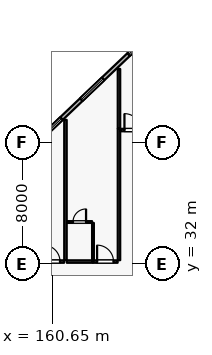
"""IFC4 building model, lengths in metres.
Left out: names, types, materials, properties, quantities, classifications, styles, units other than length and angle.
Written with IfcOpenShell. Run it as: python <this file> out.ifc"""

import sys

from ifc_helpers import new_model, si_unit, direction, frame, frame_2d, origin, place, context, subcontext, project, spatial, rectangle, extrude, element, fill, save


model = new_model("IFC4")
c1 = context("Model", 3, precision=1e-05, world=origin(), true_north=direction((0.0, 1.0)))
c2 = subcontext(c1, "Body", "Model", "MODEL_VIEW")
j1 = project(units=[si_unit("LENGTHUNIT", "METRE"), si_unit("PLANEANGLEUNIT", "RADIAN")], contexts=[c1])
p1 = place(None, origin())
s1 = spatial("IfcSite", under=j1, at=p1, CompositionType="ELEMENT")
p2 = place(p1, origin())
s2 = spatial("IfcBuilding", under=s1, at=p2, CompositionType="ELEMENT")
p3 = place(p2, frame((0.0, 0.0, 32.4)))
s3 = spatial("IfcBuildingStorey", under=s2, at=p3, CompositionType="ELEMENT", Elevation=32.4)
p4 = place(p3, frame((159.95, 40.333, 0.0), z_axis=(0.0, 0.0, 1.0), x_axis=(0.724105170588, 0.689689569247, 0.0)))
e1 = element("IfcWall", 1, at=p4, inside=s3, PredefinedType="SOLIDWALL", context=c2, shape_type="SweptSolid", body=[
    extrude(rectangle(XDim=10.634, YDim=0.24, at=frame_2d((5.317, 0.0))), origin(), (0.0, 0.0, 1.0), 2.89),
])
p5 = place(p4, frame((0.215, 0.0, 0.8)))
e2 = element("IfcOpeningElement", 2, at=p5, cuts=e1, PredefinedType="OPENING", context=c2, shape_type="SweptSolid", body=[
    extrude(rectangle(XDim=1.6, YDim=1.6, at=frame_2d((0.8, 0.8))), frame((0.0, 0.13, 0.0), z_axis=(0.0, -1.0, 0.0), x_axis=(1.0, 0.0, 0.0)), (0.0, 0.0, 1.0), 0.26),
])
p6 = place(p4, frame((3.599, 0.0, 0.8)))
e3 = element("IfcOpeningElement", 3, at=p6, cuts=e1, PredefinedType="OPENING", context=c2, shape_type="SweptSolid", body=[
    extrude(rectangle(XDim=2.0, YDim=1.75, at=frame_2d((1.0, 0.875))), frame((0.0, 0.13, 0.0), z_axis=(0.0, -1.0, 0.0), x_axis=(1.0, 0.0, 0.0)), (0.0, 0.0, 1.0), 0.26),
])
p7 = place(p4, frame((7.901, 0.0, 0.8)))
e4 = element("IfcOpeningElement", 4, at=p7, cuts=e1, PredefinedType="OPENING", context=c2, shape_type="SweptSolid", body=[
    extrude(rectangle(XDim=2.0, YDim=1.75, at=frame_2d((1.0, 0.875))), frame((0.0, 0.13, 0.0), z_axis=(0.0, -1.0, 0.0), x_axis=(1.0, 0.0, 0.0)), (0.0, 0.0, 1.0), 0.26),
])
p8 = place(p3, frame((159.81, 32.17, 0.0), z_axis=(0.0, 0.0, 1.0), x_axis=(1.0, 0.0, 0.0)))
e5 = element("IfcWall", 5, at=p8, inside=s3, PredefinedType="PARTITIONING", context=c2, shape_type="SweptSolid", body=[
    extrude(rectangle(XDim=1.62, YDim=0.16, at=frame_2d((0.81, 0.0))), origin(), (0.0, 0.0, 1.0), 3.335),
])
p9 = place(p8, frame((0.27, 0.0, 0.0)))
e6 = element("IfcOpeningElement", 6, at=p9, cuts=e5, PredefinedType="OPENING", context=c2, shape_type="SweptSolid", body=[
    extrude(rectangle(XDim=1.08, YDim=2.3, at=frame_2d((0.54, 1.15))), frame((0.0, 0.09, 0.0), z_axis=(0.0, -1.0, 0.0), x_axis=(1.0, 0.0, 0.0)), (0.0, 0.0, 1.0), 0.18),
])
p10 = place(p3, frame((161.61, 32.17, 0.0), z_axis=(0.0, 0.0, 1.0), x_axis=(1.0, 0.0, 0.0)))
e7 = element("IfcWall", 7, at=p10, inside=s3, PredefinedType="PARTITIONING", context=c2, shape_type="SweptSolid", body=[
    extrude(rectangle(XDim=1.71, YDim=0.16, at=frame_2d((0.855, 0.0))), origin(), (0.0, 0.0, 1.0), 3.335),
])
p11 = place(p3, frame((163.33, 32.17, 0.0), z_axis=(0.0, 0.0, 1.0), x_axis=(1.0, 0.0, 0.0)))
e8 = element("IfcWall", 8, at=p11, inside=s3, PredefinedType="PARTITIONING", context=c2, shape_type="SweptSolid", body=[
    extrude(rectangle(XDim=1.62, YDim=0.16, at=frame_2d((0.81, 0.0))), origin(), (0.0, 0.0, 1.0), 3.335),
])
p12 = place(p11, frame((0.27, 0.0, 0.0)))
e9 = element("IfcOpeningElement", 9, at=p12, cuts=e8, PredefinedType="OPENING", context=c2, shape_type="SweptSolid", body=[
    extrude(rectangle(XDim=1.08, YDim=2.3, at=frame_2d((0.54, 1.15))), frame((0.0, 0.09, 0.0), z_axis=(0.0, -1.0, 0.0), x_axis=(1.0, 0.0, 0.0)), (0.0, 0.0, 1.0), 0.18),
])
p13 = place(p3, frame((163.33, 32.26, 0.0), z_axis=(0.0, 0.0, 1.0), x_axis=(0.0, 1.0, 0.0)))
e10 = element("IfcWall", 10, at=p13, inside=s3, PredefinedType="PARTITIONING", context=c2, shape_type="SweptSolid", body=[
    extrude(rectangle(XDim=2.45, YDim=0.115, at=frame_2d((1.225, 0.0))), origin(), (0.0, 0.0, 1.0), 3.335),
])
p14 = place(p3, frame((161.62, 34.77, 0.0), z_axis=(0.0, 0.0, 1.0), x_axis=(1.0, 0.0, 0.0)))
e11 = element("IfcWall", 11, at=p14, inside=s3, PredefinedType="PARTITIONING", context=c2, shape_type="SweptSolid", body=[
    extrude(rectangle(XDim=1.65, YDim=0.115, at=frame_2d((0.825, 0.0))), origin(), (0.0, 0.0, 1.0), 3.335),
])
p15 = place(p14, frame((0.395, 0.0, 0.0)))
e12 = element("IfcOpeningElement", 12, at=p15, cuts=e11, PredefinedType="OPENING", context=c2, shape_type="SweptSolid", body=[
    extrude(rectangle(XDim=0.86, YDim=2.12, at=frame_2d((0.43, 1.06))), frame((0.0, 0.067, 0.0), z_axis=(0.0, -1.0, 0.0), x_axis=(1.0, 0.0, 0.0)), (0.0, 0.0, 1.0), 0.135),
])
p16 = place(p3, frame((161.52, 32.26, 0.0), z_axis=(0.0, 0.0, 1.0), x_axis=(0.0, 1.0, 0.0)))
e13 = element("IfcWall", 13, at=p16, inside=s3, PredefinedType="PARTITIONING", context=c2, shape_type="SweptSolid", body=[
    extrude(rectangle(XDim=9.23, YDim=0.16, at=frame_2d((4.615, 0.0))), origin(), (0.0, 0.0, 1.0), 3.335),
])
p17 = place(p3, frame((165.04, 32.26, 0.0), z_axis=(0.0, 0.0, 1.0), x_axis=(0.0, 1.0, 0.0)))
e14 = element("IfcWall", 14, at=p17, inside=s3, PredefinedType="PARTITIONING", context=c2, shape_type="SweptSolid", body=[
    extrude(rectangle(XDim=8.64, YDim=0.16, at=frame_2d((4.32, 0.0))), origin(), (0.0, 0.0, 1.0), 3.335),
])
p18 = place(p3, frame((165.13, 40.82, 0.0), z_axis=(0.0, 0.0, 1.0), x_axis=(1.0, 0.0, 0.0)))
e15 = element("IfcWall", 15, at=p18, inside=s3, PredefinedType="PARTITIONING", context=c2, shape_type="SweptSolid", body=[
    extrude(rectangle(XDim=1.62, YDim=0.16, at=frame_2d((0.81, 0.0))), origin(), (0.0, 0.0, 1.0), 3.335),
])
p19 = place(p18, frame((0.27, 0.0, 0.0)))
e16 = element("IfcOpeningElement", 16, at=p19, cuts=e15, PredefinedType="OPENING", context=c2, shape_type="SweptSolid", body=[
    extrude(rectangle(XDim=1.08, YDim=2.3, at=frame_2d((0.54, 1.15))), frame((0.0, 0.09, 0.0), z_axis=(0.0, -1.0, 0.0), x_axis=(1.0, 0.0, 0.0)), (0.0, 0.0, 1.0), 0.18),
])
p20 = place(p3, frame((165.04, 40.91, 0.0), z_axis=(0.0, 0.0, 1.0), x_axis=(0.0, 1.0, 0.0)))
e17 = element("IfcWall", 17, at=p20, inside=s3, PredefinedType="PARTITIONING", context=c2, shape_type="SweptSolid", body=[
    extrude(rectangle(XDim=3.93, YDim=0.16, at=frame_2d((1.965, 0.0))), origin(), (0.0, 0.0, 1.0), 3.335),
])
p21 = place(p5, origin())
e18 = element("IfcWindow", 18, at=p21, inside=s3, PartitioningType="SINGLE_PANEL", PredefinedType="WINDOW", context=c2, shape_type="SweptSolid", body=[
    extrude(rectangle(XDim=1.6, YDim=1.6, at=frame_2d((0.8, 0.8))), frame((0.0, 0.03, 0.0), z_axis=(0.0, -1.0, 0.0), x_axis=(1.0, 0.0, 0.0)), (0.0, 0.0, 1.0), 0.06),
])
fill(e2, e18)
p22 = place(p6, origin())
e19 = element("IfcWindow", 19, at=p22, inside=s3, PartitioningType="DOUBLE_PANEL_VERTICAL", PredefinedType="WINDOW", context=c2, shape_type="SweptSolid", body=[
    extrude(rectangle(XDim=2.0, YDim=1.75, at=frame_2d((1.0, 0.875))), frame((0.0, 0.03, 0.0), z_axis=(0.0, -1.0, 0.0), x_axis=(1.0, 0.0, 0.0)), (0.0, 0.0, 1.0), 0.06),
])
fill(e3, e19)
p23 = place(p7, origin())
e20 = element("IfcWindow", 20, at=p23, inside=s3, PartitioningType="DOUBLE_PANEL_VERTICAL", PredefinedType="WINDOW", context=c2, shape_type="SweptSolid", body=[
    extrude(rectangle(XDim=2.0, YDim=1.75, at=frame_2d((1.0, 0.875))), frame((0.0, 0.03, 0.0), z_axis=(0.0, -1.0, 0.0), x_axis=(1.0, 0.0, 0.0)), (0.0, 0.0, 1.0), 0.06),
])
fill(e4, e20)
p24 = place(p9, origin())
e21 = element("IfcDoor", 21, at=p24, inside=s3, OperationType="SINGLE_SWING_LEFT", PredefinedType="DOOR", context=c2, shape_type="SweptSolid", body=[
    extrude(rectangle(XDim=1.08, YDim=2.3, at=frame_2d((0.54, 1.15))), frame((0.0, 0.025, 0.0), z_axis=(0.0, -1.0, 0.0), x_axis=(1.0, 0.0, 0.0)), (0.0, 0.0, 1.0), 0.05),
])
fill(e6, e21)
p25 = place(p12, origin())
e22 = element("IfcDoor", 22, at=p25, inside=s3, OperationType="SINGLE_SWING_LEFT", PredefinedType="DOOR", context=c2, shape_type="SweptSolid", body=[
    extrude(rectangle(XDim=1.08, YDim=2.3, at=frame_2d((0.54, 1.15))), frame((0.0, 0.025, 0.0), z_axis=(0.0, -1.0, 0.0), x_axis=(1.0, 0.0, 0.0)), (0.0, 0.0, 1.0), 0.05),
])
fill(e9, e22)
p26 = place(p15, origin())
e23 = element("IfcDoor", 23, at=p26, inside=s3, OperationType="SINGLE_SWING_RIGHT", PredefinedType="DOOR", context=c2, shape_type="SweptSolid", body=[
    extrude(rectangle(XDim=0.86, YDim=2.12, at=frame_2d((0.43, 1.06))), frame((0.0, 0.025, 0.0), z_axis=(0.0, -1.0, 0.0), x_axis=(1.0, 0.0, 0.0)), (0.0, 0.0, 1.0), 0.05),
])
fill(e12, e23)
p27 = place(p19, origin())
e24 = element("IfcDoor", 24, at=p27, inside=s3, OperationType="SINGLE_SWING_LEFT", PredefinedType="DOOR", context=c2, shape_type="SweptSolid", body=[
    extrude(rectangle(XDim=1.08, YDim=2.3, at=frame_2d((0.54, 1.15))), frame((0.0, 0.025, 0.0), z_axis=(0.0, -1.0, 0.0), x_axis=(1.0, 0.0, 0.0)), (0.0, 0.0, 1.0), 0.05),
])
fill(e16, e24)
save(model, sys.argv[1])
